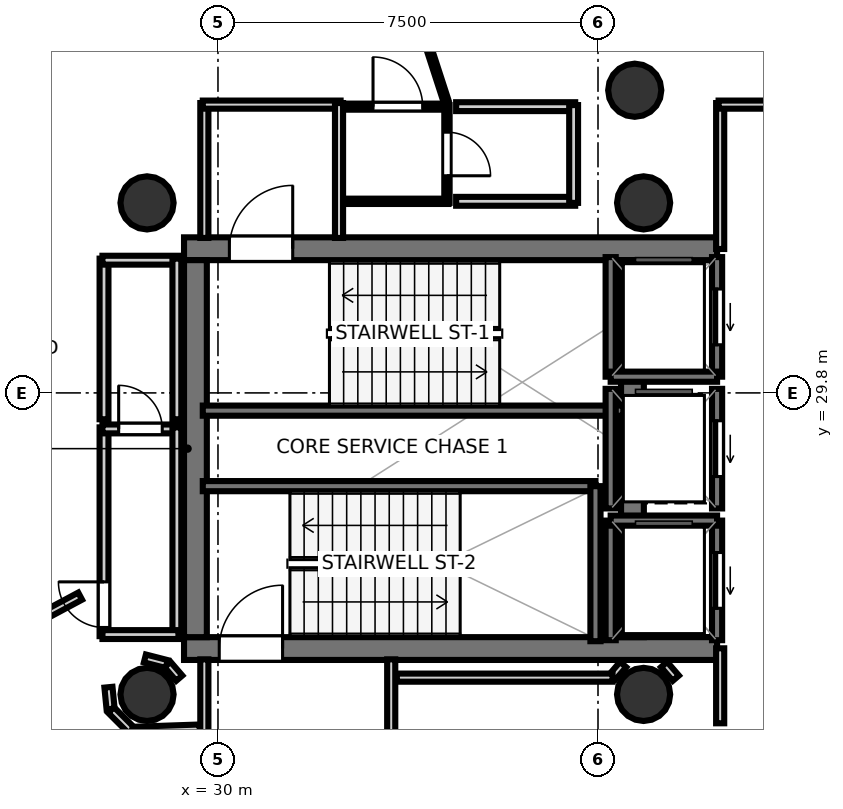
"""IFC4 building model, lengths in metres.
Left out: names, types, materials, properties, quantities, classifications, styles, units other than length and angle.
Written with IfcOpenShell. Run it as: python <this file> out.ifc"""

import sys

from ifc_helpers import new_model, si_unit, direction, frame, frame_2d, origin, origin_2d, place, context, subcontext, project, spatial, rectangle, hollow_circle, extrude, element, fill, save


model = new_model("IFC4")
c1 = context("Model", 3, precision=1e-05, world=origin(), true_north=direction((0.0, 1.0)))
c2 = subcontext(c1, "Body", "Model", "MODEL_VIEW")
j1 = project(units=[si_unit("LENGTHUNIT", "METRE"), si_unit("PLANEANGLEUNIT", "RADIAN")], contexts=[c1])
p1 = place(None, origin())
s1 = spatial("IfcSite", under=j1, at=p1, CompositionType="ELEMENT")
p2 = place(p1, origin())
s2 = spatial("IfcBuilding", under=s1, at=p2, CompositionType="ELEMENT")
p3 = place(p2, frame((0.0, 0.0, 234.5)))
s3 = spatial("IfcBuildingStorey", under=s2, at=p3, CompositionType="ELEMENT", Elevation=234.5)
p4 = place(p3, frame((29.33, 32.645, 0.0), z_axis=(0.0, 0.0, 1.0), x_axis=(1.0, 0.0, 0.0)))
e1 = element("IfcWall", 1, at=p4, inside=s3, PredefinedType="SHEAR", context=c2, shape_type="SweptSolid", body=[
    extrude(rectangle(XDim=10.52, YDim=0.45, at=frame_2d((5.26, 0.0))), origin(), (0.0, 0.0, 1.0), 4.32),
])
p5 = place(p4, frame((0.895, 0.0, 0.0)))
e2 = element("IfcOpeningElement", 2, at=p5, cuts=e1, PredefinedType="OPENING", context=c2, shape_type="SweptSolid", body=[
    extrude(rectangle(XDim=1.25, YDim=2.15, at=frame_2d((0.625, 1.075))), frame((0.0, 0.235, 0.0), z_axis=(0.0, -1.0, 0.0), x_axis=(1.0, 0.0, 0.0)), (0.0, 0.0, 1.0), 0.47),
])
p6 = place(p3, frame((29.33, 24.755, 0.0), z_axis=(0.0, 0.0, 1.0), x_axis=(1.0, 0.0, 0.0)))
e3 = element("IfcWall", 3, at=p6, inside=s3, PredefinedType="SHEAR", context=c2, shape_type="SweptSolid", body=[
    extrude(rectangle(XDim=10.52, YDim=0.45, at=frame_2d((5.26, 0.0))), origin(), (0.0, 0.0, 1.0), 4.32),
])
p7 = place(p6, frame((0.695, 0.0, 0.0)))
e4 = element("IfcOpeningElement", 4, at=p7, cuts=e3, PredefinedType="OPENING", context=c2, shape_type="SweptSolid", body=[
    extrude(rectangle(XDim=1.25, YDim=2.15, at=frame_2d((0.625, 1.075))), frame((0.0, 0.235, 0.0), z_axis=(0.0, -1.0, 0.0), x_axis=(1.0, 0.0, 0.0)), (0.0, 0.0, 1.0), 0.47),
])
for number, where, z_axis, x_axis in (
    (5, (29.555, 24.98, 0.0), (0.0, 0.0, 1.0), (0.0, 1.0, 0.0)),
    (6, (38.18, 24.98, 0.0), (0.0, 0.0, 1.0), (0.0, 1.0, 0.0)),
):
    element("IfcWall", number, at=place(p3, frame(where, z_axis=z_axis, x_axis=x_axis)), inside=s3, PredefinedType="SHEAR", context=c2, shape_type="SweptSolid", body=[
        extrude(rectangle(XDim=7.44, YDim=0.45, at=frame_2d((3.72, 0.0))), origin(), (0.0, 0.0, 1.0), 4.32),
    ])
for number, where, z_axis, x_axis in (
    (7, (28.6, 33.55, 0.0), (0.0, 0.0, 1.0), (1.0, 0.0, 0.0)),
    (8, (28.6, 23.85, 0.0), (0.0, 0.0, 1.0), (1.0, 0.0, 0.0)),
    (9, (38.4, 33.55, 0.0), (0.0, 0.0, 1.0), (1.0, 0.0, 0.0)),
    (10, (38.4, 23.85, 0.0), (0.0, 0.0, 1.0), (1.0, 0.0, 0.0)),
):
    element("IfcColumn", number, at=place(p3, frame(where, z_axis=z_axis, x_axis=x_axis)), inside=s3, PredefinedType="COLUMN", context=c2, shape_type="SweptSolid", body=[
        extrude(hollow_circle(Radius=0.525, WallThickness=0.028, at=origin_2d()), origin(), (0.0, 0.0, 1.0), 4.5),
    ])
p8 = place(p3, frame((38.225, 35.773, -0.27), z_axis=(0.0, 0.0, 1.0), x_axis=(1.0, 0.0, 0.0)))
e11 = element("IfcColumn", 11, at=p8, inside=s3, PredefinedType="COLUMN", context=c2, shape_type="SweptSolid", body=[
    extrude(hollow_circle(Radius=0.525, WallThickness=0.028, at=origin_2d()), origin(), (0.0, 0.0, 1.0), 4.77),
])
p9 = place(p3, frame((29.7, 29.45, 0.0), z_axis=(0.0, 0.0, 1.0), x_axis=(1.0, 0.0, 0.0)))
e12 = element("IfcWall", 12, at=p9, inside=s3, PredefinedType="SOLIDWALL", context=c2, shape_type="SweptSolid", body=[
    extrude(rectangle(XDim=8.3, YDim=0.2, at=frame_2d((4.15, 0.0))), origin(), (0.0, 0.0, 1.0), 4.32),
])
p10 = place(p3, frame((29.7, 27.96, 0.0), z_axis=(0.0, 0.0, 1.0), x_axis=(1.0, 0.0, 0.0)))
e13 = element("IfcWall", 13, at=p10, inside=s3, PredefinedType="SOLIDWALL", context=c2, shape_type="SweptSolid", body=[
    extrude(rectangle(XDim=7.75, YDim=0.2, at=frame_2d((3.875, 0.0))), origin(), (0.0, 0.0, 1.0), 4.32),
])
p11 = place(p3, frame((37.45, 24.9, 0.0), z_axis=(0.0, 0.0, 1.0), x_axis=(0.0, 1.0, 0.0)))
e14 = element("IfcWall", 14, at=p11, inside=s3, PredefinedType="SOLIDWALL", context=c2, shape_type="SweptSolid", body=[
    extrude(rectangle(XDim=3.06, YDim=0.2, at=frame_2d((1.53, 0.0))), origin(), (0.0, 0.0, 1.0), 4.32),
])
p12 = place(p3, frame((39.85, 30.12, 0.0), z_axis=(0.0, 0.0, 1.0), x_axis=(0.0, 1.0, 0.0)))
e15 = element("IfcWall", 15, at=p12, inside=s3, PredefinedType="SOLIDWALL", context=c2, shape_type="SweptSolid", body=[
    extrude(rectangle(XDim=2.36, YDim=0.2, at=frame_2d((1.18, 0.0))), origin(), (0.0, 0.0, 1.0), 4.32),
])
p13 = place(p12, frame((0.63, 0.0, 0.0)))
e16 = element("IfcOpeningElement", 16, at=p13, cuts=e15, PredefinedType="OPENING", context=c2, shape_type="SweptSolid", body=[
    extrude(rectangle(XDim=1.1, YDim=2.15, at=frame_2d((0.55, 1.075))), frame((0.0, 0.11, 0.0), z_axis=(0.0, -1.0, 0.0), x_axis=(1.0, 0.0, 0.0)), (0.0, 0.0, 1.0), 0.22),
])
p14 = place(p3, frame((37.75, 30.12, 0.0), z_axis=(0.0, 0.0, 1.0), x_axis=(0.0, 1.0, 0.0)))
e17 = element("IfcWall", 17, at=p14, inside=s3, PredefinedType="SOLIDWALL", context=c2, shape_type="SweptSolid", body=[
    extrude(rectangle(XDim=2.36, YDim=0.2, at=frame_2d((1.18, 0.0))), origin(), (0.0, 0.0, 1.0), 4.32),
])
p15 = place(p3, frame((37.75, 30.12, 0.0), z_axis=(0.0, 0.0, 1.0), x_axis=(1.0, 0.0, 0.0)))
e18 = element("IfcWall", 18, at=p15, inside=s3, PredefinedType="SOLIDWALL", context=c2, shape_type="SweptSolid", body=[
    extrude(rectangle(XDim=2.1, YDim=0.2, at=frame_2d((1.05, 0.0))), origin(), (0.0, 0.0, 1.0), 4.32),
])
p16 = place(p3, frame((39.85, 24.92, 0.0), z_axis=(0.0, 0.0, 1.0), x_axis=(0.0, 1.0, 0.0)))
e19 = element("IfcWall", 19, at=p16, inside=s3, PredefinedType="SOLIDWALL", context=c2, shape_type="SweptSolid", body=[
    extrude(rectangle(XDim=2.36, YDim=0.2, at=frame_2d((1.18, 0.0))), origin(), (0.0, 0.0, 1.0), 4.32),
])
p17 = place(p16, frame((0.63, 0.0, 0.0)))
e20 = element("IfcOpeningElement", 20, at=p17, cuts=e19, PredefinedType="OPENING", context=c2, shape_type="SweptSolid", body=[
    extrude(rectangle(XDim=1.1, YDim=2.15, at=frame_2d((0.55, 1.075))), frame((0.0, 0.11, 0.0), z_axis=(0.0, -1.0, 0.0), x_axis=(1.0, 0.0, 0.0)), (0.0, 0.0, 1.0), 0.22),
])
p18 = place(p3, frame((37.75, 24.92, 0.0), z_axis=(0.0, 0.0, 1.0), x_axis=(0.0, 1.0, 0.0)))
e21 = element("IfcWall", 21, at=p18, inside=s3, PredefinedType="SOLIDWALL", context=c2, shape_type="SweptSolid", body=[
    extrude(rectangle(XDim=2.36, YDim=0.2, at=frame_2d((1.18, 0.0))), origin(), (0.0, 0.0, 1.0), 4.32),
])
p19 = place(p3, frame((37.75, 27.28, 0.0), z_axis=(0.0, 0.0, 1.0), x_axis=(1.0, 0.0, 0.0)))
e22 = element("IfcWall", 22, at=p19, inside=s3, PredefinedType="SOLIDWALL", context=c2, shape_type="SweptSolid", body=[
    extrude(rectangle(XDim=2.1, YDim=0.2, at=frame_2d((1.05, 0.0))), origin(), (0.0, 0.0, 1.0), 4.32),
])
p20 = place(p3, frame((39.85, 27.52, 0.0), z_axis=(0.0, 0.0, 1.0), x_axis=(0.0, 1.0, 0.0)))
e23 = element("IfcWall", 23, at=p20, inside=s3, PredefinedType="SOLIDWALL", context=c2, shape_type="SweptSolid", body=[
    extrude(rectangle(XDim=2.36, YDim=0.2, at=frame_2d((1.18, 0.0))), origin(), (0.0, 0.0, 1.0), 4.32),
])
p21 = place(p20, frame((0.63, 0.0, 0.0)))
e24 = element("IfcOpeningElement", 24, at=p21, cuts=e23, PredefinedType="OPENING", context=c2, shape_type="SweptSolid", body=[
    extrude(rectangle(XDim=1.1, YDim=2.15, at=frame_2d((0.55, 1.075))), frame((0.0, 0.11, 0.0), z_axis=(0.0, -1.0, 0.0), x_axis=(1.0, 0.0, 0.0)), (0.0, 0.0, 1.0), 0.22),
])
p22 = place(p3, frame((37.75, 27.52, 0.0), z_axis=(0.0, 0.0, 1.0), x_axis=(0.0, 1.0, 0.0)))
e25 = element("IfcWall", 25, at=p22, inside=s3, PredefinedType="SOLIDWALL", context=c2, shape_type="SweptSolid", body=[
    extrude(rectangle(XDim=2.36, YDim=0.2, at=frame_2d((1.18, 0.0))), origin(), (0.0, 0.0, 1.0), 4.32),
])
p23 = place(p3, frame((29.731, 32.858, 0.0), z_axis=(0.0, 0.0, 1.0), x_axis=(0.0, 1.0, 0.0)))
e26 = element("IfcWall", 26, at=p23, inside=s3, PredefinedType="PARTITIONING", context=c2, shape_type="SweptSolid", body=[
    extrude(rectangle(XDim=2.662, YDim=0.16, at=frame_2d((1.331, 0.0))), origin(), (0.0, 0.0, 1.0), 3.64),
])
p24 = place(p3, frame((29.7, 35.489, 0.0), z_axis=(0.0, 0.0, 1.0), x_axis=(1.0, 0.0, 0.0)))
e27 = element("IfcWall", 27, at=p24, inside=s3, PredefinedType="PARTITIONING", context=c2, shape_type="SweptSolid", body=[
    extrude(rectangle(XDim=2.72, YDim=0.16, at=frame_2d((1.36, 0.0))), origin(), (0.0, 0.0, 1.0), 3.64),
])
p25 = place(p3, frame((32.389, 35.52, 0.0), z_axis=(0.0, 0.0, 1.0), x_axis=(0.0, -1.0, 0.0)))
e28 = element("IfcWall", 28, at=p25, inside=s3, PredefinedType="PARTITIONING", context=c2, shape_type="SweptSolid", body=[
    extrude(rectangle(XDim=2.662, YDim=0.16, at=frame_2d((1.331, 0.0))), origin(), (0.0, 0.0, 1.0), 3.64),
])
for number, where, z_axis, x_axis in (
    (29, (29.731, 21.85, 0.0), (0.0, 0.0, 1.0), (0.0, 1.0, 0.0)),
    (30, (33.419, 24.542, 0.0), (0.0, 0.0, 1.0), (0.0, -1.0, 0.0)),
):
    element("IfcWall", number, at=place(p3, frame(where, z_axis=z_axis, x_axis=x_axis)), inside=s3, PredefinedType="PARTITIONING", context=c2, shape_type="SweptSolid", body=[
        extrude(rectangle(XDim=2.692, YDim=0.16, at=frame_2d((1.346, 0.0))), origin(), (0.0, 0.0, 1.0), 3.64),
    ])
p26 = place(p3, frame((39.911, 23.28, 0.0), z_axis=(0.0, 0.0, 1.0), x_axis=(0.0, 1.0, 0.0)))
e31 = element("IfcWall", 31, at=p26, inside=s3, PredefinedType="PARTITIONING", context=c2, shape_type="SweptSolid", body=[
    extrude(rectangle(XDim=1.48, YDim=0.16, at=frame_2d((0.74, 0.0))), origin(), (0.0, 0.0, 1.0), 3.64),
])
p27 = place(p3, frame((39.911, 32.64, 0.0), z_axis=(0.0, 0.0, 1.0), x_axis=(0.0, 1.0, 0.0)))
e32 = element("IfcWall", 32, at=p27, inside=s3, PredefinedType="PARTITIONING", context=c2, shape_type="SweptSolid", body=[
    extrude(rectangle(XDim=2.88, YDim=0.16, at=frame_2d((1.44, 0.0))), origin(), (0.0, 0.0, 1.0), 3.64),
])
p28 = place(p3, frame((39.88, 35.489, 0.0), z_axis=(0.0, 0.0, 1.0), x_axis=(1.0, 0.0, 0.0)))
e33 = element("IfcWall", 33, at=p28, inside=s3, PredefinedType="PARTITIONING", context=c2, shape_type="SweptSolid", body=[
    extrude(rectangle(XDim=1.48, YDim=0.16, at=frame_2d((0.74, 0.0))), origin(), (0.0, 0.0, 1.0), 3.64),
])
p29 = place(p3, frame((34.55, 33.581, 0.0), z_axis=(0.0, 0.0, 1.0), x_axis=(-1.0, 0.0, 0.0)))
e34 = element("IfcWall", 34, at=p29, inside=s3, PredefinedType="PARTITIONING", context=c2, shape_type="SweptSolid", body=[
    extrude(rectangle(XDim=2.0, YDim=0.105, at=frame_2d((1.0, 0.0))), origin(), (0.0, 0.0, 1.0), 3.64),
])
p30 = place(p3, frame((32.55, 35.449, 0.0), z_axis=(0.0, 0.0, 1.0), x_axis=(1.0, 0.0, 0.0)))
e35 = element("IfcWall", 35, at=p30, inside=s3, PredefinedType="PARTITIONING", context=c2, shape_type="SweptSolid", body=[
    extrude(rectangle(XDim=2.0, YDim=0.12, at=frame_2d((1.0, 0.0))), origin(), (0.0, 0.0, 1.0), 3.64),
])
p31 = place(p30, frame((0.51, 0.0, 0.0)))
e36 = element("IfcOpeningElement", 36, at=p31, cuts=e35, PredefinedType="OPENING", context=c2, shape_type="SweptSolid", body=[
    extrude(rectangle(XDim=0.98, YDim=2.1, at=frame_2d((0.49, 1.05))), frame((0.0, 0.07, 0.0), z_axis=(0.0, -1.0, 0.0), x_axis=(1.0, 0.0, 0.0)), (0.0, 0.0, 1.0), 0.14),
])
p32 = place(p3, frame((34.519, 35.48, 0.0), z_axis=(0.0, 0.0, 1.0), x_axis=(0.0, -1.0, 0.0)))
e37 = element("IfcWall", 37, at=p32, inside=s3, PredefinedType="PARTITIONING", context=c2, shape_type="SweptSolid", body=[
    extrude(rectangle(XDim=1.93, YDim=0.105, at=frame_2d((0.965, 0.0))), origin(), (0.0, 0.0, 1.0), 3.64),
])
p33 = place(p32, frame((0.535, 0.0, 0.0)))
e38 = element("IfcOpeningElement", 38, at=p33, cuts=e37, PredefinedType="OPENING", context=c2, shape_type="SweptSolid", body=[
    extrude(rectangle(XDim=0.86, YDim=2.05, at=frame_2d((0.43, 1.025))), frame((0.0, 0.062, 0.0), z_axis=(0.0, -1.0, 0.0), x_axis=(1.0, 0.0, 0.0)), (0.0, 0.0, 1.0), 0.125),
])
for number, where, z_axis, x_axis in (
    (39, (37.05, 33.581, 0.0), (0.0, 0.0, 1.0), (-1.0, 0.0, 0.0)),
    (40, (34.7, 35.449, 0.0), (0.0, 0.0, 1.0), (1.0, 0.0, 0.0)),
):
    element("IfcWall", number, at=place(p3, frame(where, z_axis=z_axis, x_axis=x_axis)), inside=s3, PredefinedType="PLUMBINGWALL", context=c2, shape_type="SweptSolid", body=[
        extrude(rectangle(XDim=2.35, YDim=0.175, at=frame_2d((1.175, 0.0))), origin(), (0.0, 0.0, 1.0), 3.64),
    ])
p34 = place(p3, frame((37.019, 35.48, 0.0), z_axis=(0.0, 0.0, 1.0), x_axis=(0.0, -1.0, 0.0)))
e41 = element("IfcWall", 41, at=p34, inside=s3, PredefinedType="PLUMBINGWALL", context=c2, shape_type="SweptSolid", body=[
    extrude(rectangle(XDim=1.93, YDim=0.175, at=frame_2d((0.965, 0.0))), origin(), (0.0, 0.0, 1.0), 3.64),
])
p35 = place(p3, frame((27.751, 25.0, 0.0), z_axis=(0.0, 0.0, 1.0), x_axis=(0.0, 1.0, 0.0)))
e42 = element("IfcWall", 42, at=p35, inside=s3, PredefinedType="PLUMBINGWALL", context=c2, shape_type="SweptSolid", body=[
    extrude(rectangle(XDim=4.12, YDim=0.175, at=frame_2d((2.06, 0.0))), origin(), (0.0, 0.0, 1.0), 3.64),
])
p36 = place(p35, frame((0.171, 0.0, 0.0)))
e43 = element("IfcOpeningElement", 43, at=p36, cuts=e42, PredefinedType="OPENING", context=c2, shape_type="SweptSolid", body=[
    extrude(rectangle(XDim=0.9, YDim=2.1, at=frame_2d((0.45, 1.05))), frame((0.0, 0.097, 0.0), z_axis=(0.0, -1.0, 0.0), x_axis=(1.0, 0.0, 0.0)), (0.0, 0.0, 1.0), 0.195),
])
p37 = place(p3, frame((27.72, 29.089, 0.0), z_axis=(0.0, 0.0, 1.0), x_axis=(1.0, 0.0, 0.0)))
e44 = element("IfcWall", 44, at=p37, inside=s3, PredefinedType="PLUMBINGWALL", context=c2, shape_type="SweptSolid", body=[
    extrude(rectangle(XDim=1.5, YDim=0.175, at=frame_2d((0.75, 0.0))), origin(), (0.0, 0.0, 1.0), 3.64),
])
p38 = place(p37, frame((0.32, 0.0, 0.0)))
e45 = element("IfcOpeningElement", 45, at=p38, cuts=e44, PredefinedType="OPENING", context=c2, shape_type="SweptSolid", body=[
    extrude(rectangle(XDim=0.86, YDim=2.05, at=frame_2d((0.43, 1.025))), frame((0.0, 0.097, 0.0), z_axis=(0.0, -1.0, 0.0), x_axis=(1.0, 0.0, 0.0)), (0.0, 0.0, 1.0), 0.195),
])
p39 = place(p3, frame((29.189, 29.12, 0.0), z_axis=(0.0, 0.0, 1.0), x_axis=(0.0, -1.0, 0.0)))
e46 = element("IfcWall", 46, at=p39, inside=s3, PredefinedType="PLUMBINGWALL", context=c2, shape_type="SweptSolid", body=[
    extrude(rectangle(XDim=4.12, YDim=0.175, at=frame_2d((2.06, 0.0))), origin(), (0.0, 0.0, 1.0), 3.64),
])
p40 = place(p3, frame((29.22, 25.031, 0.0), z_axis=(0.0, 0.0, 1.0), x_axis=(-1.0, 0.0, 0.0)))
e47 = element("IfcWall", 47, at=p40, inside=s3, PredefinedType="PLUMBINGWALL", context=c2, shape_type="SweptSolid", body=[
    extrude(rectangle(XDim=1.5, YDim=0.175, at=frame_2d((0.75, 0.0))), origin(), (0.0, 0.0, 1.0), 3.64),
])
p41 = place(p3, frame((27.751, 29.28, 0.0), z_axis=(0.0, 0.0, 1.0), x_axis=(0.0, 1.0, 0.0)))
e48 = element("IfcWall", 48, at=p41, inside=s3, PredefinedType="PLUMBINGWALL", context=c2, shape_type="SweptSolid", body=[
    extrude(rectangle(XDim=3.17, YDim=0.175, at=frame_2d((1.585, 0.0))), origin(), (0.0, 0.0, 1.0), 3.64),
])
p42 = place(p3, frame((27.72, 32.419, 0.0), z_axis=(0.0, 0.0, 1.0), x_axis=(1.0, 0.0, 0.0)))
e49 = element("IfcWall", 49, at=p42, inside=s3, PredefinedType="PLUMBINGWALL", context=c2, shape_type="SweptSolid", body=[
    extrude(rectangle(XDim=1.5, YDim=0.175, at=frame_2d((0.75, 0.0))), origin(), (0.0, 0.0, 1.0), 3.64),
])
p43 = place(p3, frame((29.189, 32.45, 0.0), z_axis=(0.0, 0.0, 1.0), x_axis=(0.0, -1.0, 0.0)))
e50 = element("IfcWall", 50, at=p43, inside=s3, PredefinedType="PLUMBINGWALL", context=c2, shape_type="SweptSolid", body=[
    extrude(rectangle(XDim=3.17, YDim=0.175, at=frame_2d((1.585, 0.0))), origin(), (0.0, 0.0, 1.0), 3.64),
])
p44 = place(p3, frame((29.236, 24.17, 0.0), z_axis=(0.0, 0.0, 1.0), x_axis=(-0.652260263346, 0.757995084984, 0.0)))
e51 = element("IfcWall", 51, at=p44, inside=s3, PredefinedType="PARTITIONING", context=c2, shape_type="SweptSolid", body=[
    extrude(rectangle(XDim=0.355, YDim=0.16, at=frame_2d((0.178, 0.0))), origin(), (0.0, 0.0, 1.0), 3.64),
])
p45 = place(p3, frame((28.988, 24.45, 0.0), z_axis=(0.0, 0.0, 1.0), x_axis=(-0.968704505916, 0.248216800836, 0.0)))
e52 = element("IfcWall", 52, at=p45, inside=s3, PredefinedType="PARTITIONING", context=c2, shape_type="SweptSolid", body=[
    extrude(rectangle(XDim=0.445, YDim=0.16, at=frame_2d((0.222, 0.0))), origin(), (0.0, 0.0, 1.0), 3.64),
])
p46 = place(p3, frame((39.036, 24.17, 0.0), z_axis=(0.0, 0.0, 1.0), x_axis=(-0.652260263346, 0.757995084984, 0.0)))
e53 = element("IfcWall", 53, at=p46, inside=s3, PredefinedType="PARTITIONING", context=c2, shape_type="SweptSolid", body=[
    extrude(rectangle(XDim=0.355, YDim=0.16, at=frame_2d((0.178, 0.0))), origin(), (0.0, 0.0, 1.0), 3.64),
])
p47 = place(p3, frame((37.996, 24.44, 0.0), z_axis=(0.0, 0.0, 1.0), x_axis=(-0.652425645794, -0.757852740782, 0.0)))
e54 = element("IfcWall", 54, at=p47, inside=s3, PredefinedType="PARTITIONING", context=c2, shape_type="SweptSolid", body=[
    extrude(rectangle(XDim=0.32, YDim=0.16, at=frame_2d((0.16, 0.0))), origin(), (0.0, 0.0, 1.0), 3.64),
])
p48 = place(p3, frame((37.787, 24.181, 0.0), z_axis=(0.0, 0.0, 1.0), x_axis=(-1.0, 0.0, 0.0)))
e55 = element("IfcWall", 55, at=p48, inside=s3, PredefinedType="PARTITIONING", context=c2, shape_type="SweptSolid", body=[
    extrude(rectangle(XDim=4.257, YDim=0.16, at=frame_2d((2.129, 0.0))), origin(), (0.0, 0.0, 1.0), 3.64),
])
p49 = place(p3, frame((27.838, 23.992, 0.0), z_axis=(0.0, 0.0, 1.0), x_axis=(0.098273407977, -0.995159453196, 0.0)))
e56 = element("IfcWall", 56, at=p49, inside=s3, PredefinedType="PARTITIONING", context=c2, shape_type="SweptSolid", body=[
    extrude(rectangle(XDim=0.432, YDim=0.16, at=frame_2d((0.216, 0.0))), origin(), (0.0, 0.0, 1.0), 3.64),
])
p50 = place(p3, frame((27.89, 23.543, 0.0), z_axis=(0.0, 0.0, 1.0), x_axis=(0.707106781187, -0.707106781187, 0.0)))
e57 = element("IfcWall", 57, at=p50, inside=s3, PredefinedType="PARTITIONING", context=c2, shape_type="SweptSolid", body=[
    extrude(rectangle(XDim=0.57, YDim=0.16, at=frame_2d((0.285, 0.0))), origin(), (0.0, 0.0, 1.0), 3.64),
])
p51 = place(p3, frame((28.316, 23.131, 0.0), z_axis=(0.0, 0.0, 1.0), x_axis=(0.999405342193, 0.034481328227, 0.0)))
e58 = element("IfcWall", 58, at=p51, inside=s3, PredefinedType="PARTITIONING", context=c2, shape_type="SweptSolid", body=[
    extrude(rectangle(XDim=1.324, YDim=0.16, at=frame_2d((0.662, 0.0))), origin(), (0.0, 0.0, 1.0), 3.64),
])
p52 = place(p3, frame((25.965, 25.086, 0.0), z_axis=(0.0, 0.0, 1.0), x_axis=(0.881881208279, 0.471471668803, 0.0)))
e59 = element("IfcWall", 59, at=p52, inside=s3, PredefinedType="PARTITIONING", context=c2, shape_type="SweptSolid", body=[
    extrude(rectangle(XDim=1.491, YDim=0.16, at=frame_2d((0.746, 0.0))), origin(), (0.0, 0.0, 1.0), 3.64),
])
p53 = place(p3, frame((34.497, 35.57, 0.0), z_axis=(0.0, 0.0, 1.0), x_axis=(-0.308984127741, 0.951067194684, 0.0)))
e60 = element("IfcWall", 60, at=p53, inside=s3, PredefinedType="PARTITIONING", context=c2, shape_type="SweptSolid", body=[
    extrude(rectangle(XDim=2.329, YDim=0.105, at=frame_2d((1.164, 0.0))), origin(), (0.0, 0.0, 1.0), 3.64),
])
p54 = place(p5, origin())
e61 = element("IfcDoor", 61, at=p54, inside=s3, OperationType="SINGLE_SWING_RIGHT", PredefinedType="DOOR", context=c2, shape_type="SweptSolid", body=[
    extrude(rectangle(XDim=1.25, YDim=2.15, at=frame_2d((0.625, 1.075))), frame((0.0, 0.025, 0.0), z_axis=(0.0, -1.0, 0.0), x_axis=(1.0, 0.0, 0.0)), (0.0, 0.0, 1.0), 0.05),
])
fill(e2, e61)
p55 = place(p7, origin())
e62 = element("IfcDoor", 62, at=p55, inside=s3, OperationType="SINGLE_SWING_RIGHT", PredefinedType="DOOR", context=c2, shape_type="SweptSolid", body=[
    extrude(rectangle(XDim=1.25, YDim=2.15, at=frame_2d((0.625, 1.075))), frame((0.0, 0.025, 0.0), z_axis=(0.0, -1.0, 0.0), x_axis=(1.0, 0.0, 0.0)), (0.0, 0.0, 1.0), 0.05),
])
fill(e4, e62)
p56 = place(p13, origin())
e63 = element("IfcDoor", 63, at=p56, inside=s3, OperationType="SLIDING_TO_LEFT", PredefinedType="DOOR", context=c2, shape_type="SweptSolid", body=[
    extrude(rectangle(XDim=1.1, YDim=2.15, at=frame_2d((0.55, 1.075))), frame((0.0, 0.025, 0.0), z_axis=(0.0, -1.0, 0.0), x_axis=(1.0, 0.0, 0.0)), (0.0, 0.0, 1.0), 0.05),
])
fill(e16, e63)
p57 = place(p17, origin())
e64 = element("IfcDoor", 64, at=p57, inside=s3, OperationType="SLIDING_TO_LEFT", PredefinedType="DOOR", context=c2, shape_type="SweptSolid", body=[
    extrude(rectangle(XDim=1.1, YDim=2.15, at=frame_2d((0.55, 1.075))), frame((0.0, 0.025, 0.0), z_axis=(0.0, -1.0, 0.0), x_axis=(1.0, 0.0, 0.0)), (0.0, 0.0, 1.0), 0.05),
])
fill(e20, e64)
p58 = place(p21, origin())
e65 = element("IfcDoor", 65, at=p58, inside=s3, OperationType="SLIDING_TO_LEFT", PredefinedType="DOOR", context=c2, shape_type="SweptSolid", body=[
    extrude(rectangle(XDim=1.1, YDim=2.15, at=frame_2d((0.55, 1.075))), frame((0.0, 0.025, 0.0), z_axis=(0.0, -1.0, 0.0), x_axis=(1.0, 0.0, 0.0)), (0.0, 0.0, 1.0), 0.05),
])
fill(e24, e65)
p59 = place(p36, origin())
e66 = element("IfcDoor", 66, at=p59, inside=s3, OperationType="SINGLE_SWING_RIGHT", PredefinedType="DOOR", context=c2, shape_type="SweptSolid", body=[
    extrude(rectangle(XDim=0.9, YDim=2.1, at=frame_2d((0.45, 1.05))), frame((0.0, 0.025, 0.0), z_axis=(0.0, -1.0, 0.0), x_axis=(1.0, 0.0, 0.0)), (0.0, 0.0, 1.0), 0.05),
])
fill(e43, e66)
p60 = place(p38, origin())
e67 = element("IfcDoor", 67, at=p60, inside=s3, OperationType="SINGLE_SWING_LEFT", PredefinedType="DOOR", context=c2, shape_type="SweptSolid", body=[
    extrude(rectangle(XDim=0.86, YDim=2.05, at=frame_2d((0.43, 1.025))), frame((0.0, 0.025, 0.0), z_axis=(0.0, -1.0, 0.0), x_axis=(1.0, 0.0, 0.0)), (0.0, 0.0, 1.0), 0.05),
])
fill(e45, e67)
p61 = place(p31, origin())
e68 = element("IfcDoor", 68, at=p61, inside=s3, OperationType="SINGLE_SWING_LEFT", PredefinedType="DOOR", context=c2, shape_type="SweptSolid", body=[
    extrude(rectangle(XDim=0.98, YDim=2.1, at=frame_2d((0.49, 1.05))), frame((0.0, 0.025, 0.0), z_axis=(0.0, -1.0, 0.0), x_axis=(1.0, 0.0, 0.0)), (0.0, 0.0, 1.0), 0.05),
])
fill(e36, e68)
p62 = place(p33, origin())
e69 = element("IfcDoor", 69, at=p62, inside=s3, OperationType="SINGLE_SWING_RIGHT", PredefinedType="DOOR", context=c2, shape_type="SweptSolid", body=[
    extrude(rectangle(XDim=0.86, YDim=2.05, at=frame_2d((0.43, 1.025))), frame((0.0, 0.025, 0.0), z_axis=(0.0, -1.0, 0.0), x_axis=(1.0, 0.0, 0.0)), (0.0, 0.0, 1.0), 0.05),
])
fill(e38, e69)
save(model, sys.argv[1])
